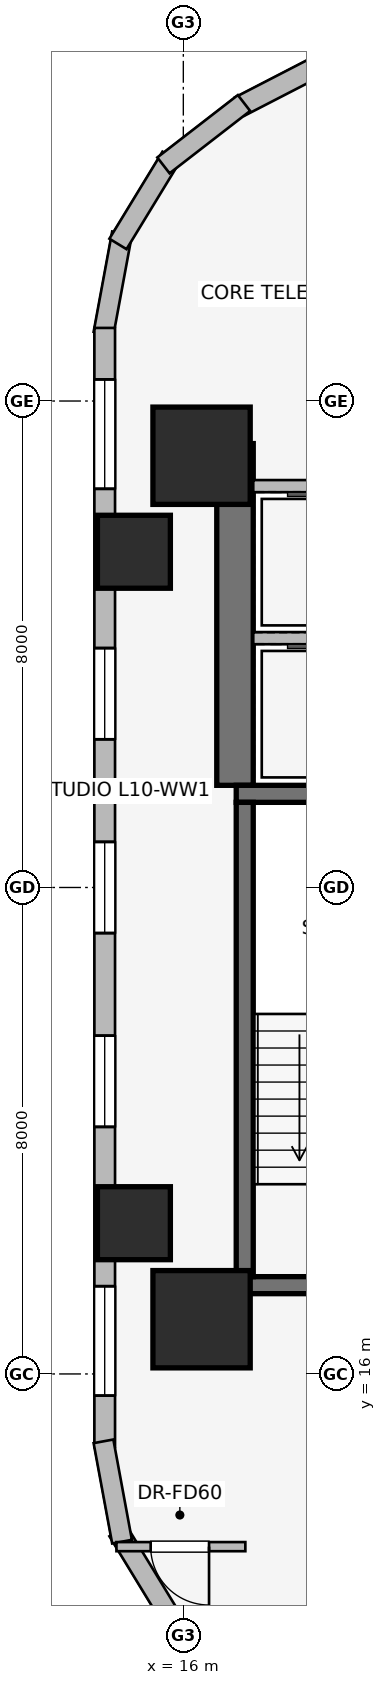
"""IFC4 building model, lengths in metres.
Left out: names, types, materials, properties, quantities, classifications, styles, units other than length and angle.
Written with IfcOpenShell. Run it as: python <this file> out.ifc"""

import sys

from ifc_helpers import new_model, si_unit, direction, frame, frame_2d, origin, origin_2d, place, context, subcontext, project, spatial, rectangle, extrude, element, fill, save


model = new_model("IFC4")
c1 = context("Model", 3, precision=1e-05, world=origin(), true_north=direction((0.0, 1.0)))
c2 = subcontext(c1, "Body", "Model", "MODEL_VIEW")
j1 = project(units=[si_unit("LENGTHUNIT", "METRE"), si_unit("PLANEANGLEUNIT", "RADIAN")], contexts=[c1])
p1 = place(None, origin())
s1 = spatial("IfcSite", under=j1, at=p1, CompositionType="ELEMENT")
p2 = place(p1, origin())
s2 = spatial("IfcBuilding", under=s1, at=p2, CompositionType="ELEMENT")
p3 = place(p2, frame((0.0, 0.0, 41.6)))
s3 = spatial("IfcBuildingStorey", under=s2, at=p3, CompositionType="ELEMENT", Elevation=41.6)
p4 = place(p3, frame((16.85, 25.68, 0.0), z_axis=(0.0, 0.0, 1.0), x_axis=(0.0, 1.0, 0.0)))
e1 = element("IfcWall", 1, at=p4, inside=s3, PredefinedType="SHEAR", context=c2, shape_type="SweptSolid", body=[
    extrude(rectangle(XDim=5.62, YDim=0.6, at=frame_2d((2.81, 0.0))), origin(), (0.0, 0.0, 1.0), 3.65),
])
for number, where, z_axis, x_axis in (
    (2, (16.87, 17.46, 0.0), (0.0, 0.0, 1.0), (1.0, 0.0, 0.0)),
    (3, (20.63, 25.54, 0.0), (0.0, 0.0, 1.0), (-1.0, 0.0, 0.0)),
):
    element("IfcWall", number, at=place(p3, frame(where, z_axis=z_axis, x_axis=x_axis)), inside=s3, PredefinedType="SHEAR", context=c2, shape_type="SweptSolid", body=[
        extrude(rectangle(XDim=3.76, YDim=0.28, at=frame_2d((1.88, 0.0))), origin(), (0.0, 0.0, 1.0), 3.65),
    ])
p5 = place(p3, frame((17.01, 25.4, 0.0), z_axis=(0.0, 0.0, 1.0), x_axis=(0.0, -1.0, 0.0)))
e4 = element("IfcWall", 4, at=p5, inside=s3, PredefinedType="SHEAR", context=c2, shape_type="SweptSolid", body=[
    extrude(rectangle(XDim=7.8, YDim=0.28, at=frame_2d((3.9, 0.0))), origin(), (0.0, 0.0, 1.0), 3.65),
])
for number, where, z_axis, x_axis in (
    (5, (16.3, 16.9, 0.0), (0.0, 0.0, 1.0), (1.0, 0.0, 0.0)),
    (6, (16.3, 31.1, 0.0), (0.0, 0.0, 1.0), (1.0, 0.0, 0.0)),
):
    element("IfcColumn", number, at=place(p3, frame(where, z_axis=z_axis, x_axis=x_axis)), inside=s3, PredefinedType="COLUMN", context=c2, shape_type="SweptSolid", body=[
        extrude(rectangle(XDim=1.6, YDim=1.6, at=origin_2d()), origin(), (0.0, 0.0, 1.0), 3.65),
    ])
for number, where, z_axis, x_axis in (
    (7, (15.187, 29.521, 0.0), (0.0, 0.0, 1.0), (1.0, 0.0, 0.0)),
    (8, (15.187, 18.479, 0.0), (0.0, 0.0, 1.0), (1.0, 0.0, 0.0)),
):
    element("IfcColumn", number, at=place(p3, frame(where, z_axis=z_axis, x_axis=x_axis)), inside=s3, PredefinedType="COLUMN", context=c2, shape_type="SweptSolid", body=[
        extrude(rectangle(XDim=1.2, YDim=1.2, at=origin_2d()), origin(), (0.0, 0.0, 1.0), 3.65),
    ])
p6 = place(p3, frame((16.924, 36.841, 0.0), z_axis=(0.0, 0.0, 1.0), x_axis=(0.888634413993, 0.458616264721, 0.0)))
e9 = element("IfcWall", 9, at=p6, inside=s3, PredefinedType="STANDARD", context=c2, shape_type="SweptSolid", body=[
    extrude(rectangle(XDim=20.531, YDim=0.34, at=frame_2d((10.266, 0.0))), origin(), (0.0, 0.0, 1.0), 2.684),
])
p7 = place(p6, frame((2.161, 0.0, 0.75)))
e10 = element("IfcOpeningElement", 10, at=p7, cuts=e9, PredefinedType="OPENING", context=c2, shape_type="SweptSolid", body=[
    extrude(rectangle(XDim=1.05, YDim=1.4, at=frame_2d((0.525, 0.7))), frame((0.0, 0.18, 0.0), z_axis=(0.0, -1.0, 0.0), x_axis=(1.0, 0.0, 0.0)), (0.0, 0.0, 1.0), 0.36),
])
p8 = place(p6, frame((5.903, 0.0, 0.75)))
e11 = element("IfcOpeningElement", 11, at=p8, cuts=e9, PredefinedType="OPENING", context=c2, shape_type="SweptSolid", body=[
    extrude(rectangle(XDim=1.5, YDim=1.5, at=frame_2d((0.75, 0.75))), frame((0.0, 0.18, 0.0), z_axis=(0.0, -1.0, 0.0), x_axis=(1.0, 0.0, 0.0)), (0.0, 0.0, 1.0), 0.36),
])
p9 = place(p6, frame((9.516, 0.0, 0.75)))
e12 = element("IfcOpeningElement", 12, at=p9, cuts=e9, PredefinedType="OPENING", context=c2, shape_type="SweptSolid", body=[
    extrude(rectangle(XDim=1.5, YDim=1.5, at=frame_2d((0.75, 0.75))), frame((0.0, 0.18, 0.0), z_axis=(0.0, -1.0, 0.0), x_axis=(1.0, 0.0, 0.0)), (0.0, 0.0, 1.0), 0.36),
])
p10 = place(p6, frame((13.129, 0.0, 0.75)))
e13 = element("IfcOpeningElement", 13, at=p10, cuts=e9, PredefinedType="OPENING", context=c2, shape_type="SweptSolid", body=[
    extrude(rectangle(XDim=1.5, YDim=1.5, at=frame_2d((0.75, 0.75))), frame((0.0, 0.18, 0.0), z_axis=(0.0, -1.0, 0.0), x_axis=(1.0, 0.0, 0.0)), (0.0, 0.0, 1.0), 0.36),
])
p11 = place(p6, frame((17.476, 0.0, 0.75)))
e14 = element("IfcOpeningElement", 14, at=p11, cuts=e9, PredefinedType="OPENING", context=c2, shape_type="SweptSolid", body=[
    extrude(rectangle(XDim=1.05, YDim=1.4, at=frame_2d((0.525, 0.7))), frame((0.0, 0.18, 0.0), z_axis=(0.0, -1.0, 0.0), x_axis=(1.0, 0.0, 0.0)), (0.0, 0.0, 1.0), 0.36),
])
p12 = place(p3, frame((14.687, 33.108, 0.0), z_axis=(0.0, 0.0, 1.0), x_axis=(0.181714143354, 0.983351397063, 0.0)))
e15 = element("IfcWall", 15, at=p12, inside=s3, PredefinedType="STANDARD", context=c2, shape_type="SweptSolid", body=[
    extrude(rectangle(XDim=1.678, YDim=0.33, at=frame_2d((0.839, 0.0))), origin(), (0.0, 0.0, 1.0), 3.39),
])
p13 = place(p3, frame((14.925, 34.583, 0.0), z_axis=(0.0, 0.0, 1.0), x_axis=(0.520584129191, 0.853810379671, 0.0)))
e16 = element("IfcWall", 16, at=p13, inside=s3, PredefinedType="STANDARD", context=c2, shape_type="SweptSolid", body=[
    extrude(rectangle(XDim=1.677, YDim=0.33, at=frame_2d((0.838, 0.0))), origin(), (0.0, 0.0, 1.0), 3.39),
])
p14 = place(p3, frame((15.673, 35.875, 0.0), z_axis=(0.0, 0.0, 1.0), x_axis=(0.790691856293, 0.61221433207, 0.0)))
e17 = element("IfcWall", 17, at=p14, inside=s3, PredefinedType="STANDARD", context=c2, shape_type="SweptSolid", body=[
    extrude(rectangle(XDim=1.676, YDim=0.33, at=frame_2d((0.838, 0.0))), origin(), (0.0, 0.0, 1.0), 3.39),
])
p15 = place(p3, frame((14.707, 14.798, 0.0), z_axis=(0.0, 0.0, 1.0), x_axis=(0.0, 1.0, 0.0)))
e18 = element("IfcWall", 18, at=p15, inside=s3, PredefinedType="STANDARD", context=c2, shape_type="SweptSolid", body=[
    extrude(rectangle(XDim=18.404, YDim=0.34, at=frame_2d((9.202, 0.0))), origin(), (0.0, 0.0, 1.0), 2.684),
])
p16 = place(p15, frame((0.845, 0.0, 0.75)))
e19 = element("IfcOpeningElement", 19, at=p16, cuts=e18, PredefinedType="OPENING", context=c2, shape_type="SweptSolid", body=[
    extrude(rectangle(XDim=1.8, YDim=1.5, at=frame_2d((0.9, 0.75))), frame((0.0, 0.18, 0.0), z_axis=(0.0, -1.0, 0.0), x_axis=(1.0, 0.0, 0.0)), (0.0, 0.0, 1.0), 0.36),
])
p17 = place(p15, frame((5.265, 0.0, 0.75)))
e20 = element("IfcOpeningElement", 20, at=p17, cuts=e18, PredefinedType="OPENING", context=c2, shape_type="SweptSolid", body=[
    extrude(rectangle(XDim=1.5, YDim=1.5, at=frame_2d((0.75, 0.75))), frame((0.0, 0.18, 0.0), z_axis=(0.0, -1.0, 0.0), x_axis=(1.0, 0.0, 0.0)), (0.0, 0.0, 1.0), 0.36),
])
p18 = place(p15, frame((8.452, 0.0, 0.75)))
e21 = element("IfcOpeningElement", 21, at=p18, cuts=e18, PredefinedType="OPENING", context=c2, shape_type="SweptSolid", body=[
    extrude(rectangle(XDim=1.5, YDim=1.5, at=frame_2d((0.75, 0.75))), frame((0.0, 0.18, 0.0), z_axis=(0.0, -1.0, 0.0), x_axis=(1.0, 0.0, 0.0)), (0.0, 0.0, 1.0), 0.36),
])
p19 = place(p15, frame((11.639, 0.0, 0.75)))
e22 = element("IfcOpeningElement", 22, at=p19, cuts=e18, PredefinedType="OPENING", context=c2, shape_type="SweptSolid", body=[
    extrude(rectangle(XDim=1.5, YDim=1.5, at=frame_2d((0.75, 0.75))), frame((0.0, 0.18, 0.0), z_axis=(0.0, -1.0, 0.0), x_axis=(1.0, 0.0, 0.0)), (0.0, 0.0, 1.0), 0.36),
])
p20 = place(p15, frame((15.758, 0.0, 0.75)))
e23 = element("IfcOpeningElement", 23, at=p20, cuts=e18, PredefinedType="OPENING", context=c2, shape_type="SweptSolid", body=[
    extrude(rectangle(XDim=1.8, YDim=1.5, at=frame_2d((0.9, 0.75))), frame((0.0, 0.18, 0.0), z_axis=(0.0, -1.0, 0.0), x_axis=(1.0, 0.0, 0.0)), (0.0, 0.0, 1.0), 0.36),
])
p21 = place(p3, frame((16.998, 11.099, 0.0), z_axis=(0.0, 0.0, 1.0), x_axis=(-0.790691856293, 0.61221433207, 0.0)))
e24 = element("IfcWall", 24, at=p21, inside=s3, PredefinedType="STANDARD", context=c2, shape_type="SweptSolid", body=[
    extrude(rectangle(XDim=1.676, YDim=0.33, at=frame_2d((0.838, 0.0))), origin(), (0.0, 0.0, 1.0), 3.39),
])
p22 = place(p3, frame((15.798, 11.985, 0.0), z_axis=(0.0, 0.0, 1.0), x_axis=(-0.520584129191, 0.853810379671, 0.0)))
e25 = element("IfcWall", 25, at=p22, inside=s3, PredefinedType="STANDARD", context=c2, shape_type="SweptSolid", body=[
    extrude(rectangle(XDim=1.677, YDim=0.33, at=frame_2d((0.838, 0.0))), origin(), (0.0, 0.0, 1.0), 3.39),
])
p23 = place(p3, frame((14.992, 13.242, 0.0), z_axis=(0.0, 0.0, 1.0), x_axis=(-0.181714143354, 0.983351397063, 0.0)))
e26 = element("IfcWall", 26, at=p23, inside=s3, PredefinedType="STANDARD", context=c2, shape_type="SweptSolid", body=[
    extrude(rectangle(XDim=1.678, YDim=0.33, at=frame_2d((0.839, 0.0))), origin(), (0.0, 0.0, 1.0), 3.39),
])
p24 = place(p3, frame((17.15, 28.1, 0.0), z_axis=(0.0, 0.0, 1.0), x_axis=(1.0, 0.0, 0.0)))
e27 = element("IfcWall", 27, at=p24, inside=s3, PredefinedType="PARTITIONING", context=c2, shape_type="SweptSolid", body=[
    extrude(rectangle(XDim=2.5, YDim=0.2, at=frame_2d((1.25, 0.0))), origin(), (0.0, 0.0, 1.0), 3.39),
])
p25 = place(p3, frame((19.65, 30.6, 0.0), z_axis=(0.0, 0.0, 1.0), x_axis=(-1.0, 0.0, 0.0)))
e28 = element("IfcWall", 28, at=p25, inside=s3, PredefinedType="PARTITIONING", context=c2, shape_type="SweptSolid", body=[
    extrude(rectangle(XDim=2.5, YDim=0.2, at=frame_2d((1.25, 0.0))), origin(), (0.0, 0.0, 1.0), 2.29),
])
p26 = place(p3, frame((17.02, 13.16, 0.0), z_axis=(0.0, 0.0, 1.0), x_axis=(-1.0, 0.0, 0.0)))
e29 = element("IfcWall", 29, at=p26, inside=s3, PredefinedType="PARTITIONING", context=c2, shape_type="SweptSolid", body=[
    extrude(rectangle(XDim=2.12, YDim=0.15, at=frame_2d((1.06, 0.0))), origin(), (0.0, 0.0, 1.0), 3.39),
])
p27 = place(p26, frame((0.597, 0.0, 0.0)))
e30 = element("IfcOpeningElement", 30, at=p27, cuts=e29, PredefinedType="OPENING", context=c2, shape_type="SweptSolid", body=[
    extrude(rectangle(XDim=0.96, YDim=2.0, at=frame_2d((0.48, 1.0))), frame((0.0, 0.085, 0.0), z_axis=(0.0, -1.0, 0.0), x_axis=(1.0, 0.0, 0.0)), (0.0, 0.0, 1.0), 0.17),
])
p28 = place(p16, origin())
e31 = element("IfcWindow", 31, at=p28, inside=s3, PartitioningType="SINGLE_PANEL", PredefinedType="WINDOW", context=c2, shape_type="SweptSolid", body=[
    extrude(rectangle(XDim=1.8, YDim=1.5, at=frame_2d((0.9, 0.75))), frame((0.0, 0.03, 0.0), z_axis=(0.0, -1.0, 0.0), x_axis=(1.0, 0.0, 0.0)), (0.0, 0.0, 1.0), 0.06),
])
fill(e19, e31)
p29 = place(p17, origin())
e32 = element("IfcWindow", 32, at=p29, inside=s3, PartitioningType="SINGLE_PANEL", PredefinedType="WINDOW", context=c2, shape_type="SweptSolid", body=[
    extrude(rectangle(XDim=1.5, YDim=1.5, at=frame_2d((0.75, 0.75))), frame((0.0, 0.03, 0.0), z_axis=(0.0, -1.0, 0.0), x_axis=(1.0, 0.0, 0.0)), (0.0, 0.0, 1.0), 0.06),
])
fill(e20, e32)
p30 = place(p18, origin())
e33 = element("IfcWindow", 33, at=p30, inside=s3, PartitioningType="SINGLE_PANEL", PredefinedType="WINDOW", context=c2, shape_type="SweptSolid", body=[
    extrude(rectangle(XDim=1.5, YDim=1.5, at=frame_2d((0.75, 0.75))), frame((0.0, 0.03, 0.0), z_axis=(0.0, -1.0, 0.0), x_axis=(1.0, 0.0, 0.0)), (0.0, 0.0, 1.0), 0.06),
])
fill(e21, e33)
p31 = place(p19, origin())
e34 = element("IfcWindow", 34, at=p31, inside=s3, PartitioningType="SINGLE_PANEL", PredefinedType="WINDOW", context=c2, shape_type="SweptSolid", body=[
    extrude(rectangle(XDim=1.5, YDim=1.5, at=frame_2d((0.75, 0.75))), frame((0.0, 0.03, 0.0), z_axis=(0.0, -1.0, 0.0), x_axis=(1.0, 0.0, 0.0)), (0.0, 0.0, 1.0), 0.06),
])
fill(e22, e34)
p32 = place(p20, origin())
e35 = element("IfcWindow", 35, at=p32, inside=s3, PartitioningType="SINGLE_PANEL", PredefinedType="WINDOW", context=c2, shape_type="SweptSolid", body=[
    extrude(rectangle(XDim=1.8, YDim=1.5, at=frame_2d((0.9, 0.75))), frame((0.0, 0.03, 0.0), z_axis=(0.0, -1.0, 0.0), x_axis=(1.0, 0.0, 0.0)), (0.0, 0.0, 1.0), 0.06),
])
fill(e23, e35)
p33 = place(p27, origin())
e36 = element("IfcDoor", 36, at=p33, inside=s3, OperationType="SINGLE_SWING_LEFT", PredefinedType="DOOR", context=c2, shape_type="SweptSolid", body=[
    extrude(rectangle(XDim=0.96, YDim=2.0, at=frame_2d((0.48, 1.0))), frame((0.0, 0.025, 0.0), z_axis=(0.0, -1.0, 0.0), x_axis=(1.0, 0.0, 0.0)), (0.0, 0.0, 1.0), 0.05),
])
fill(e30, e36)
save(model, sys.argv[1])
